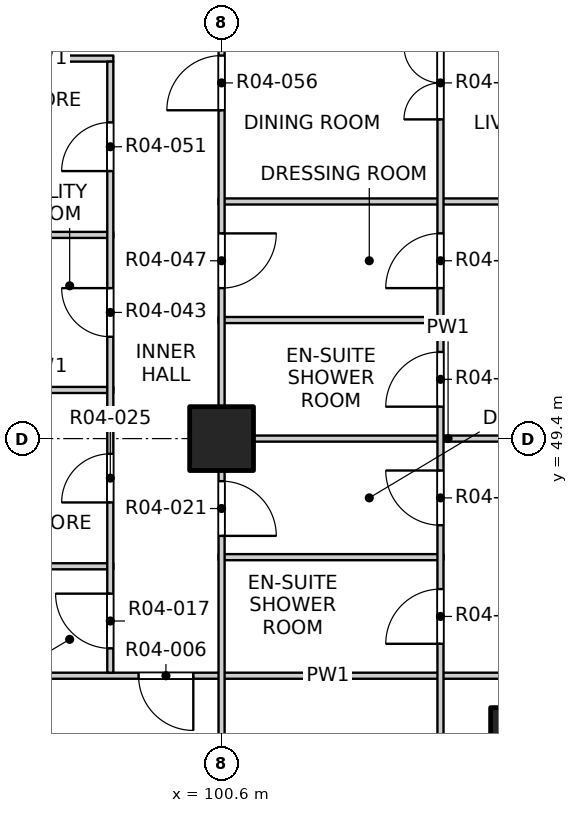
"""IFC4 building model, lengths in metres.
Left out: names, types, materials, properties, quantities, classifications, styles, units other than length and angle.
Written with IfcOpenShell. Run it as: python <this file> out.ifc"""

import sys

from ifc_helpers import new_model, si_unit, direction, frame, frame_2d, origin, origin_2d, place, context, subcontext, project, spatial, rectangle, extrude, element, fill, save


model = new_model("IFC4")
c1 = context("Model", 3, precision=1e-05, world=origin(), true_north=direction((0.0, 1.0)))
c2 = subcontext(c1, "Body", "Model", "MODEL_VIEW")
j1 = project(units=[si_unit("LENGTHUNIT", "METRE"), si_unit("PLANEANGLEUNIT", "RADIAN")], contexts=[c1])
p1 = place(None, origin())
s1 = spatial("IfcSite", under=j1, at=p1, CompositionType="ELEMENT")
p2 = place(p1, origin())
s2 = spatial("IfcBuilding", under=s1, at=p2, CompositionType="ELEMENT")
p3 = place(p2, frame((0.0, 0.0, 58.0)))
s3 = spatial("IfcBuildingStorey", under=s2, at=p3, CompositionType="ELEMENT", Elevation=58.0)
p4 = place(p3, frame((105.5, 44.5, -0.25), z_axis=(0.0, 0.0, 1.0), x_axis=(1.0, 0.0, 0.0)))
e1 = element("IfcColumn", 1, at=p4, inside=s3, PredefinedType="COLUMN", context=c2, shape_type="SweptSolid", body=[
    extrude(rectangle(XDim=0.95, YDim=0.95, at=origin_2d()), origin(), (0.0, 0.0, 1.0), 3.4),
])
p5 = place(p3, frame((100.6, 49.4, -0.25), z_axis=(0.0, 0.0, 1.0), x_axis=(1.0, 0.0, 0.0)))
e2 = element("IfcColumn", 2, at=p5, inside=s3, PredefinedType="COLUMN", context=c2, shape_type="SweptSolid", body=[
    extrude(rectangle(XDim=1.05, YDim=1.05, at=origin_2d()), origin(), (0.0, 0.0, 1.0), 3.4),
])
p6 = place(p3, frame((96.6, 45.5, 0.0), z_axis=(0.0, 0.0, 1.0), x_axis=(1.0, 0.0, 0.0)))
e3 = element("IfcWall", 3, at=p6, inside=s3, PredefinedType="PARTITIONING", context=c2, shape_type="SweptSolid", body=[
    extrude(rectangle(XDim=11.5, YDim=0.1, at=frame_2d((5.75, 0.0))), origin(), (0.0, 0.0, 1.0), 3.15),
])
p7 = place(p6, frame((2.635, 0.0, 0.0)))
e4 = element("IfcOpeningElement", 4, at=p7, cuts=e3, PredefinedType="OPENING", context=c2, shape_type="SweptSolid", body=[
    extrude(rectangle(XDim=0.9, YDim=2.1, at=frame_2d((0.45, 1.05))), frame((0.0, 0.06, 0.0), z_axis=(0.0, -1.0, 0.0), x_axis=(1.0, 0.0, 0.0)), (0.0, 0.0, 1.0), 0.12),
])
p8 = place(p3, frame((96.6, 47.3, 0.0), z_axis=(0.0, 0.0, 1.0), x_axis=(1.0, 0.0, 0.0)))
e5 = element("IfcWall", 5, at=p8, inside=s3, PredefinedType="PARTITIONING", context=c2, shape_type="SweptSolid", body=[
    extrude(rectangle(XDim=2.22, YDim=0.1, at=frame_2d((1.11, 0.0))), origin(), (0.0, 0.0, 1.0), 3.15),
])
p9 = place(p3, frame((100.55, 47.45, 0.0), z_axis=(0.0, 0.0, 1.0), x_axis=(1.0, 0.0, 0.0)))
e6 = element("IfcWall", 6, at=p9, inside=s3, PredefinedType="PARTITIONING", context=c2, shape_type="SweptSolid", body=[
    extrude(rectangle(XDim=3.7, YDim=0.1, at=frame_2d((1.85, 0.0))), origin(), (0.0, 0.0, 1.0), 3.15),
])
p10 = place(p3, frame((100.55, 49.4, 0.0), z_axis=(0.0, 0.0, 1.0), x_axis=(1.0, 0.0, 0.0)))
e7 = element("IfcWall", 7, at=p10, inside=s3, PredefinedType="PARTITIONING", context=c2, shape_type="SweptSolid", body=[
    extrude(rectangle(XDim=7.55, YDim=0.1, at=frame_2d((3.775, 0.0))), origin(), (0.0, 0.0, 1.0), 2.55),
])
p11 = place(p3, frame((96.6, 50.2, 0.0), z_axis=(0.0, 0.0, 1.0), x_axis=(1.0, 0.0, 0.0)))
e8 = element("IfcWall", 8, at=p11, inside=s3, PredefinedType="PARTITIONING", context=c2, shape_type="SweptSolid", body=[
    extrude(rectangle(XDim=2.22, YDim=0.1, at=frame_2d((1.11, 0.0))), origin(), (0.0, 0.0, 1.0), 3.15),
])
p12 = place(p3, frame((100.55, 51.35, 0.0), z_axis=(0.0, 0.0, 1.0), x_axis=(1.0, 0.0, 0.0)))
e9 = element("IfcWall", 9, at=p12, inside=s3, PredefinedType="PARTITIONING", context=c2, shape_type="SweptSolid", body=[
    extrude(rectangle(XDim=3.7, YDim=0.1, at=frame_2d((1.85, 0.0))), origin(), (0.0, 0.0, 1.0), 3.15),
])
p13 = place(p3, frame((96.6, 52.75, 0.0), z_axis=(0.0, 0.0, 1.0), x_axis=(1.0, 0.0, 0.0)))
e10 = element("IfcWall", 10, at=p13, inside=s3, PredefinedType="PARTITIONING", context=c2, shape_type="SweptSolid", body=[
    extrude(rectangle(XDim=2.22, YDim=0.1, at=frame_2d((1.11, 0.0))), origin(), (0.0, 0.0, 1.0), 3.15),
])
p14 = place(p3, frame((100.55, 53.3, 0.0), z_axis=(0.0, 0.0, 1.0), x_axis=(1.0, 0.0, 0.0)))
e11 = element("IfcWall", 11, at=p14, inside=s3, PredefinedType="PARTITIONING", context=c2, shape_type="SweptSolid", body=[
    extrude(rectangle(XDim=7.55, YDim=0.1, at=frame_2d((3.775, 0.0))), origin(), (0.0, 0.0, 1.0), 3.15),
])
p15 = place(p3, frame((96.6, 55.65, 0.0), z_axis=(0.0, 0.0, 1.0), x_axis=(1.0, 0.0, 0.0)))
e12 = element("IfcWall", 12, at=p15, inside=s3, PredefinedType="PARTITIONING", context=c2, shape_type="SweptSolid", body=[
    extrude(rectangle(XDim=2.22, YDim=0.1, at=frame_2d((1.11, 0.0))), origin(), (0.0, 0.0, 1.0), 3.15),
])
p16 = place(p3, frame((98.77, 45.55, 0.0), z_axis=(0.0, 0.0, 1.0), x_axis=(0.0, 1.0, 0.0)))
e13 = element("IfcWall", 13, at=p16, inside=s3, PredefinedType="PARTITIONING", context=c2, shape_type="SweptSolid", body=[
    extrude(rectangle(XDim=10.05, YDim=0.1, at=frame_2d((5.025, 0.0))), origin(), (0.0, 0.0, 1.0), 3.15),
])
p17 = place(p16, frame((0.4, 0.0, 0.0)))
e14 = element("IfcOpeningElement", 14, at=p17, cuts=e13, PredefinedType="OPENING", context=c2, shape_type="SweptSolid", body=[
    extrude(rectangle(XDim=0.9, YDim=2.1, at=frame_2d((0.45, 1.05))), frame((0.0, 0.06, 0.0), z_axis=(0.0, -1.0, 0.0), x_axis=(1.0, 0.0, 0.0)), (0.0, 0.0, 1.0), 0.12),
])
p18 = place(p16, frame((2.8, 0.0, 0.0)))
e15 = element("IfcOpeningElement", 15, at=p18, cuts=e13, PredefinedType="OPENING", context=c2, shape_type="SweptSolid", body=[
    extrude(rectangle(XDim=0.8, YDim=2.1, at=frame_2d((0.4, 1.05))), frame((0.0, 0.06, 0.0), z_axis=(0.0, -1.0, 0.0), x_axis=(1.0, 0.0, 0.0)), (0.0, 0.0, 1.0), 0.12),
])
p19 = place(p16, frame((5.525, 0.0, 0.0)))
e16 = element("IfcOpeningElement", 16, at=p19, cuts=e13, PredefinedType="OPENING", context=c2, shape_type="SweptSolid", body=[
    extrude(rectangle(XDim=0.8, YDim=2.1, at=frame_2d((0.4, 1.05))), frame((0.0, 0.06, 0.0), z_axis=(0.0, -1.0, 0.0), x_axis=(1.0, 0.0, 0.0)), (0.0, 0.0, 1.0), 0.12),
])
p20 = place(p16, frame((8.25, 0.0, 0.0)))
e17 = element("IfcOpeningElement", 17, at=p20, cuts=e13, PredefinedType="OPENING", context=c2, shape_type="SweptSolid", body=[
    extrude(rectangle(XDim=0.8, YDim=2.1, at=frame_2d((0.4, 1.05))), frame((0.0, 0.06, 0.0), z_axis=(0.0, -1.0, 0.0), x_axis=(1.0, 0.0, 0.0)), (0.0, 0.0, 1.0), 0.12),
])
p21 = place(p3, frame((100.6, 41.9, 0.0), z_axis=(0.0, 0.0, 1.0), x_axis=(0.0, 1.0, 0.0)))
e18 = element("IfcWall", 18, at=p21, inside=s3, PredefinedType="PARTITIONING", context=c2, shape_type="SweptSolid", body=[
    extrude(rectangle(XDim=7.5, YDim=0.1, at=frame_2d((3.75, 0.0))), origin(), (0.0, 0.0, 1.0), 2.55),
])
p22 = place(p21, frame((1.2, 0.0, 0.0)))
e19 = element("IfcOpeningElement", 19, at=p22, cuts=e18, PredefinedType="OPENING", context=c2, shape_type="SweptSolid", body=[
    extrude(rectangle(XDim=0.9, YDim=2.1, at=frame_2d((0.45, 1.05))), frame((0.0, 0.06, 0.0), z_axis=(0.0, -1.0, 0.0), x_axis=(1.0, 0.0, 0.0)), (0.0, 0.0, 1.0), 0.12),
])
p23 = place(p21, frame((5.9, 0.0, 0.0)))
e20 = element("IfcOpeningElement", 20, at=p23, cuts=e18, PredefinedType="OPENING", context=c2, shape_type="SweptSolid", body=[
    extrude(rectangle(XDim=0.9, YDim=2.1, at=frame_2d((0.45, 1.05))), frame((0.0, 0.06, 0.0), z_axis=(0.0, -1.0, 0.0), x_axis=(1.0, 0.0, 0.0)), (0.0, 0.0, 1.0), 0.12),
])
p24 = place(p3, frame((100.6, 49.4, 0.0), z_axis=(0.0, 0.0, 1.0), x_axis=(0.0, 1.0, 0.0)))
e21 = element("IfcWall", 21, at=p24, inside=s3, PredefinedType="PARTITIONING", context=c2, shape_type="SweptSolid", body=[
    extrude(rectangle(XDim=31.2, YDim=0.1, at=frame_2d((15.6, 0.0))), origin(), (0.0, 0.0, 1.0), 3.15),
])
p25 = place(p24, frame((2.475, 0.0, 0.0)))
e22 = element("IfcOpeningElement", 22, at=p25, cuts=e21, PredefinedType="OPENING", context=c2, shape_type="SweptSolid", body=[
    extrude(rectangle(XDim=0.9, YDim=2.1, at=frame_2d((0.45, 1.05))), frame((0.0, 0.06, 0.0), z_axis=(0.0, -1.0, 0.0), x_axis=(1.0, 0.0, 0.0)), (0.0, 0.0, 1.0), 0.12),
])
p26 = place(p24, frame((5.4, 0.0, 0.0)))
e23 = element("IfcOpeningElement", 23, at=p26, cuts=e21, PredefinedType="OPENING", context=c2, shape_type="SweptSolid", body=[
    extrude(rectangle(XDim=0.9, YDim=2.1, at=frame_2d((0.45, 1.05))), frame((0.0, 0.06, 0.0), z_axis=(0.0, -1.0, 0.0), x_axis=(1.0, 0.0, 0.0)), (0.0, 0.0, 1.0), 0.12),
])
p27 = place(p24, frame((10.275, 0.0, 0.0)))
e24 = element("IfcOpeningElement", 24, at=p27, cuts=e21, PredefinedType="OPENING", context=c2, shape_type="SweptSolid", body=[
    extrude(rectangle(XDim=0.9, YDim=2.1, at=frame_2d((0.45, 1.05))), frame((0.0, 0.06, 0.0), z_axis=(0.0, -1.0, 0.0), x_axis=(1.0, 0.0, 0.0)), (0.0, 0.0, 1.0), 0.12),
])
p28 = place(p24, frame((13.2, 0.0, 0.0)))
e25 = element("IfcOpeningElement", 25, at=p28, cuts=e21, PredefinedType="OPENING", context=c2, shape_type="SweptSolid", body=[
    extrude(rectangle(XDim=0.9, YDim=2.1, at=frame_2d((0.45, 1.05))), frame((0.0, 0.06, 0.0), z_axis=(0.0, -1.0, 0.0), x_axis=(1.0, 0.0, 0.0)), (0.0, 0.0, 1.0), 0.12),
])
p29 = place(p24, frame((17.1, 0.0, 0.0)))
e26 = element("IfcOpeningElement", 26, at=p29, cuts=e21, PredefinedType="OPENING", context=c2, shape_type="SweptSolid", body=[
    extrude(rectangle(XDim=0.9, YDim=2.1, at=frame_2d((0.45, 1.05))), frame((0.0, 0.06, 0.0), z_axis=(0.0, -1.0, 0.0), x_axis=(1.0, 0.0, 0.0)), (0.0, 0.0, 1.0), 0.12),
])
p30 = place(p24, frame((21.8, 0.0, 0.0)))
e27 = element("IfcOpeningElement", 27, at=p30, cuts=e21, PredefinedType="OPENING", context=c2, shape_type="SweptSolid", body=[
    extrude(rectangle(XDim=0.9, YDim=2.1, at=frame_2d((0.45, 1.05))), frame((0.0, 0.06, 0.0), z_axis=(0.0, -1.0, 0.0), x_axis=(1.0, 0.0, 0.0)), (0.0, 0.0, 1.0), 0.12),
])
p31 = place(p24, frame((25.875, 0.0, 0.0)))
e28 = element("IfcOpeningElement", 28, at=p31, cuts=e21, PredefinedType="OPENING", context=c2, shape_type="SweptSolid", body=[
    extrude(rectangle(XDim=0.9, YDim=2.1, at=frame_2d((0.45, 1.05))), frame((0.0, 0.06, 0.0), z_axis=(0.0, -1.0, 0.0), x_axis=(1.0, 0.0, 0.0)), (0.0, 0.0, 1.0), 0.12),
])
p32 = place(p24, frame((28.8, 0.0, 0.0)))
e29 = element("IfcOpeningElement", 29, at=p32, cuts=e21, PredefinedType="OPENING", context=c2, shape_type="SweptSolid", body=[
    extrude(rectangle(XDim=0.9, YDim=2.1, at=frame_2d((0.45, 1.05))), frame((0.0, 0.06, 0.0), z_axis=(0.0, -1.0, 0.0), x_axis=(1.0, 0.0, 0.0)), (0.0, 0.0, 1.0), 0.12),
])
p33 = place(p3, frame((104.2, 41.9, 0.0), z_axis=(0.0, 0.0, 1.0), x_axis=(0.0, 1.0, 0.0)))
e30 = element("IfcWall", 30, at=p33, inside=s3, PredefinedType="PARTITIONING", context=c2, shape_type="SweptSolid", body=[
    extrude(rectangle(XDim=46.2, YDim=0.1, at=frame_2d((23.1, 0.0))), origin(), (0.0, 0.0, 1.0), 3.15),
])
p34 = place(p33, frame((1.05, 0.0, 0.0)))
e31 = element("IfcOpeningElement", 31, at=p34, cuts=e30, PredefinedType="OPENING", context=c2, shape_type="SweptSolid", body=[
    extrude(rectangle(XDim=1.2, YDim=2.1, at=frame_2d((0.6, 1.05))), frame((0.0, 0.06, 0.0), z_axis=(0.0, -1.0, 0.0), x_axis=(1.0, 0.0, 0.0)), (0.0, 0.0, 1.0), 0.12),
])
p35 = place(p33, frame((4.125, 0.0, 0.0)))
e32 = element("IfcOpeningElement", 32, at=p35, cuts=e30, PredefinedType="OPENING", context=c2, shape_type="SweptSolid", body=[
    extrude(rectangle(XDim=0.9, YDim=2.1, at=frame_2d((0.45, 1.05))), frame((0.0, 0.06, 0.0), z_axis=(0.0, -1.0, 0.0), x_axis=(1.0, 0.0, 0.0)), (0.0, 0.0, 1.0), 0.12),
])
p36 = place(p33, frame((6.075, 0.0, 0.0)))
e33 = element("IfcOpeningElement", 33, at=p36, cuts=e30, PredefinedType="OPENING", context=c2, shape_type="SweptSolid", body=[
    extrude(rectangle(XDim=0.9, YDim=2.1, at=frame_2d((0.45, 1.05))), frame((0.0, 0.06, 0.0), z_axis=(0.0, -1.0, 0.0), x_axis=(1.0, 0.0, 0.0)), (0.0, 0.0, 1.0), 0.12),
])
p37 = place(p33, frame((8.025, 0.0, 0.0)))
e34 = element("IfcOpeningElement", 34, at=p37, cuts=e30, PredefinedType="OPENING", context=c2, shape_type="SweptSolid", body=[
    extrude(rectangle(XDim=0.9, YDim=2.1, at=frame_2d((0.45, 1.05))), frame((0.0, 0.06, 0.0), z_axis=(0.0, -1.0, 0.0), x_axis=(1.0, 0.0, 0.0)), (0.0, 0.0, 1.0), 0.12),
])
p38 = place(p33, frame((9.975, 0.0, 0.0)))
e35 = element("IfcOpeningElement", 35, at=p38, cuts=e30, PredefinedType="OPENING", context=c2, shape_type="SweptSolid", body=[
    extrude(rectangle(XDim=0.9, YDim=2.1, at=frame_2d((0.45, 1.05))), frame((0.0, 0.06, 0.0), z_axis=(0.0, -1.0, 0.0), x_axis=(1.0, 0.0, 0.0)), (0.0, 0.0, 1.0), 0.12),
])
p39 = place(p33, frame((12.75, 0.0, 0.0)))
e36 = element("IfcOpeningElement", 36, at=p39, cuts=e30, PredefinedType="OPENING", context=c2, shape_type="SweptSolid", body=[
    extrude(rectangle(XDim=1.2, YDim=2.1, at=frame_2d((0.6, 1.05))), frame((0.0, 0.06, 0.0), z_axis=(0.0, -1.0, 0.0), x_axis=(1.0, 0.0, 0.0)), (0.0, 0.0, 1.0), 0.12),
])
p40 = place(p33, frame((15.825, 0.0, 0.0)))
e37 = element("IfcOpeningElement", 37, at=p40, cuts=e30, PredefinedType="OPENING", context=c2, shape_type="SweptSolid", body=[
    extrude(rectangle(XDim=0.9, YDim=2.1, at=frame_2d((0.45, 1.05))), frame((0.0, 0.06, 0.0), z_axis=(0.0, -1.0, 0.0), x_axis=(1.0, 0.0, 0.0)), (0.0, 0.0, 1.0), 0.12),
])
p41 = place(p33, frame((17.775, 0.0, 0.0)))
e38 = element("IfcOpeningElement", 38, at=p41, cuts=e30, PredefinedType="OPENING", context=c2, shape_type="SweptSolid", body=[
    extrude(rectangle(XDim=0.9, YDim=2.1, at=frame_2d((0.45, 1.05))), frame((0.0, 0.06, 0.0), z_axis=(0.0, -1.0, 0.0), x_axis=(1.0, 0.0, 0.0)), (0.0, 0.0, 1.0), 0.12),
])
p42 = place(p33, frame((20.55, 0.0, 0.0)))
e39 = element("IfcOpeningElement", 39, at=p42, cuts=e30, PredefinedType="OPENING", context=c2, shape_type="SweptSolid", body=[
    extrude(rectangle(XDim=1.2, YDim=2.1, at=frame_2d((0.6, 1.05))), frame((0.0, 0.06, 0.0), z_axis=(0.0, -1.0, 0.0), x_axis=(1.0, 0.0, 0.0)), (0.0, 0.0, 1.0), 0.12),
])
p43 = place(p33, frame((24.45, 0.0, 0.0)))
e40 = element("IfcOpeningElement", 40, at=p43, cuts=e30, PredefinedType="OPENING", context=c2, shape_type="SweptSolid", body=[
    extrude(rectangle(XDim=1.2, YDim=2.1, at=frame_2d((0.6, 1.05))), frame((0.0, 0.06, 0.0), z_axis=(0.0, -1.0, 0.0), x_axis=(1.0, 0.0, 0.0)), (0.0, 0.0, 1.0), 0.12),
])
p44 = place(p33, frame((27.525, 0.0, 0.0)))
e41 = element("IfcOpeningElement", 41, at=p44, cuts=e30, PredefinedType="OPENING", context=c2, shape_type="SweptSolid", body=[
    extrude(rectangle(XDim=0.9, YDim=2.1, at=frame_2d((0.45, 1.05))), frame((0.0, 0.06, 0.0), z_axis=(0.0, -1.0, 0.0), x_axis=(1.0, 0.0, 0.0)), (0.0, 0.0, 1.0), 0.12),
])
p45 = place(p33, frame((29.475, 0.0, 0.0)))
e42 = element("IfcOpeningElement", 42, at=p45, cuts=e30, PredefinedType="OPENING", context=c2, shape_type="SweptSolid", body=[
    extrude(rectangle(XDim=0.9, YDim=2.1, at=frame_2d((0.45, 1.05))), frame((0.0, 0.06, 0.0), z_axis=(0.0, -1.0, 0.0), x_axis=(1.0, 0.0, 0.0)), (0.0, 0.0, 1.0), 0.12),
])
p46 = place(p33, frame((31.425, 0.0, 0.0)))
e43 = element("IfcOpeningElement", 43, at=p46, cuts=e30, PredefinedType="OPENING", context=c2, shape_type="SweptSolid", body=[
    extrude(rectangle(XDim=0.9, YDim=2.1, at=frame_2d((0.45, 1.05))), frame((0.0, 0.06, 0.0), z_axis=(0.0, -1.0, 0.0), x_axis=(1.0, 0.0, 0.0)), (0.0, 0.0, 1.0), 0.12),
])
p47 = place(p33, frame((33.375, 0.0, 0.0)))
e44 = element("IfcOpeningElement", 44, at=p47, cuts=e30, PredefinedType="OPENING", context=c2, shape_type="SweptSolid", body=[
    extrude(rectangle(XDim=0.9, YDim=2.1, at=frame_2d((0.45, 1.05))), frame((0.0, 0.06, 0.0), z_axis=(0.0, -1.0, 0.0), x_axis=(1.0, 0.0, 0.0)), (0.0, 0.0, 1.0), 0.12),
])
p48 = place(p33, frame((36.15, 0.0, 0.0)))
e45 = element("IfcOpeningElement", 45, at=p48, cuts=e30, PredefinedType="OPENING", context=c2, shape_type="SweptSolid", body=[
    extrude(rectangle(XDim=1.2, YDim=2.1, at=frame_2d((0.6, 1.05))), frame((0.0, 0.06, 0.0), z_axis=(0.0, -1.0, 0.0), x_axis=(1.0, 0.0, 0.0)), (0.0, 0.0, 1.0), 0.12),
])
p49 = place(p33, frame((39.225, 0.0, 0.0)))
e46 = element("IfcOpeningElement", 46, at=p49, cuts=e30, PredefinedType="OPENING", context=c2, shape_type="SweptSolid", body=[
    extrude(rectangle(XDim=0.9, YDim=2.1, at=frame_2d((0.45, 1.05))), frame((0.0, 0.06, 0.0), z_axis=(0.0, -1.0, 0.0), x_axis=(1.0, 0.0, 0.0)), (0.0, 0.0, 1.0), 0.12),
])
p50 = place(p33, frame((41.175, 0.0, 0.0)))
e47 = element("IfcOpeningElement", 47, at=p50, cuts=e30, PredefinedType="OPENING", context=c2, shape_type="SweptSolid", body=[
    extrude(rectangle(XDim=0.9, YDim=2.1, at=frame_2d((0.45, 1.05))), frame((0.0, 0.06, 0.0), z_axis=(0.0, -1.0, 0.0), x_axis=(1.0, 0.0, 0.0)), (0.0, 0.0, 1.0), 0.12),
])
p51 = place(p33, frame((43.95, 0.0, 0.0)))
e48 = element("IfcOpeningElement", 48, at=p51, cuts=e30, PredefinedType="OPENING", context=c2, shape_type="SweptSolid", body=[
    extrude(rectangle(XDim=1.2, YDim=2.1, at=frame_2d((0.6, 1.05))), frame((0.0, 0.06, 0.0), z_axis=(0.0, -1.0, 0.0), x_axis=(1.0, 0.0, 0.0)), (0.0, 0.0, 1.0), 0.12),
])
p52 = place(p7, origin())
e49 = element("IfcDoor", 49, at=p52, inside=s3, OperationType="SINGLE_SWING_LEFT", PredefinedType="DOOR", context=c2, shape_type="SweptSolid", body=[
    extrude(rectangle(XDim=0.9, YDim=2.1, at=frame_2d((0.45, 1.05))), frame((0.0, 0.025, 0.0), z_axis=(0.0, -1.0, 0.0), x_axis=(1.0, 0.0, 0.0)), (0.0, 0.0, 1.0), 0.05),
])
fill(e4, e49)
p53 = place(p17, origin())
e50 = element("IfcDoor", 50, at=p53, inside=s3, OperationType="SINGLE_SWING_RIGHT", PredefinedType="DOOR", context=c2, shape_type="SweptSolid", body=[
    extrude(rectangle(XDim=0.9, YDim=2.1, at=frame_2d((0.45, 1.05))), frame((0.0, 0.025, 0.0), z_axis=(0.0, -1.0, 0.0), x_axis=(1.0, 0.0, 0.0)), (0.0, 0.0, 1.0), 0.05),
])
fill(e14, e50)
p54 = place(p35, origin())
e51 = element("IfcDoor", 51, at=p54, inside=s3, OperationType="SINGLE_SWING_LEFT", PredefinedType="DOOR", context=c2, shape_type="SweptSolid", body=[
    extrude(rectangle(XDim=0.9, YDim=2.1, at=frame_2d((0.45, 1.05))), frame((0.0, 0.025, 0.0), z_axis=(0.0, -1.0, 0.0), x_axis=(1.0, 0.0, 0.0)), (0.0, 0.0, 1.0), 0.05),
])
fill(e32, e51)
p55 = place(p23, origin())
e52 = element("IfcDoor", 52, at=p55, inside=s3, OperationType="SINGLE_SWING_RIGHT", PredefinedType="DOOR", context=c2, shape_type="SweptSolid", body=[
    extrude(rectangle(XDim=0.9, YDim=2.1, at=frame_2d((0.45, 1.05))), frame((0.0, 0.025, 0.0), z_axis=(0.0, -1.0, 0.0), x_axis=(1.0, 0.0, 0.0)), (0.0, 0.0, 1.0), 0.05),
])
fill(e20, e52)
p56 = place(p36, origin())
e53 = element("IfcDoor", 53, at=p56, inside=s3, OperationType="SINGLE_SWING_RIGHT", PredefinedType="DOOR", context=c2, shape_type="SweptSolid", body=[
    extrude(rectangle(XDim=0.9, YDim=2.1, at=frame_2d((0.45, 1.05))), frame((0.0, 0.025, 0.0), z_axis=(0.0, -1.0, 0.0), x_axis=(1.0, 0.0, 0.0)), (0.0, 0.0, 1.0), 0.05),
])
fill(e33, e53)
p57 = place(p18, origin())
e54 = element("IfcDoor", 54, at=p57, inside=s3, OperationType="SINGLE_SWING_LEFT", PredefinedType="DOOR", context=c2, shape_type="SweptSolid", body=[
    extrude(rectangle(XDim=0.8, YDim=2.1, at=frame_2d((0.4, 1.05))), frame((0.0, 0.025, 0.0), z_axis=(0.0, -1.0, 0.0), x_axis=(1.0, 0.0, 0.0)), (0.0, 0.0, 1.0), 0.05),
])
fill(e15, e54)
p58 = place(p37, origin())
e55 = element("IfcDoor", 55, at=p58, inside=s3, OperationType="SINGLE_SWING_LEFT", PredefinedType="DOOR", context=c2, shape_type="SweptSolid", body=[
    extrude(rectangle(XDim=0.9, YDim=2.1, at=frame_2d((0.45, 1.05))), frame((0.0, 0.025, 0.0), z_axis=(0.0, -1.0, 0.0), x_axis=(1.0, 0.0, 0.0)), (0.0, 0.0, 1.0), 0.05),
])
fill(e34, e55)
p59 = place(p19, origin())
e56 = element("IfcDoor", 56, at=p59, inside=s3, OperationType="SINGLE_SWING_RIGHT", PredefinedType="DOOR", context=c2, shape_type="SweptSolid", body=[
    extrude(rectangle(XDim=0.8, YDim=2.1, at=frame_2d((0.4, 1.05))), frame((0.0, 0.025, 0.0), z_axis=(0.0, -1.0, 0.0), x_axis=(1.0, 0.0, 0.0)), (0.0, 0.0, 1.0), 0.05),
])
fill(e16, e56)
p60 = place(p25, origin())
e57 = element("IfcDoor", 57, at=p60, inside=s3, OperationType="SINGLE_SWING_LEFT", PredefinedType="DOOR", context=c2, shape_type="SweptSolid", body=[
    extrude(rectangle(XDim=0.9, YDim=2.1, at=frame_2d((0.45, 1.05))), frame((0.0, 0.025, 0.0), z_axis=(0.0, -1.0, 0.0), x_axis=(1.0, 0.0, 0.0)), (0.0, 0.0, 1.0), 0.05),
])
fill(e22, e57)
p61 = place(p38, origin())
e58 = element("IfcDoor", 58, at=p61, inside=s3, OperationType="SINGLE_SWING_LEFT", PredefinedType="DOOR", context=c2, shape_type="SweptSolid", body=[
    extrude(rectangle(XDim=0.9, YDim=2.1, at=frame_2d((0.45, 1.05))), frame((0.0, 0.025, 0.0), z_axis=(0.0, -1.0, 0.0), x_axis=(1.0, 0.0, 0.0)), (0.0, 0.0, 1.0), 0.05),
])
fill(e35, e58)
p62 = place(p20, origin())
e59 = element("IfcDoor", 59, at=p62, inside=s3, OperationType="SINGLE_SWING_LEFT", PredefinedType="DOOR", context=c2, shape_type="SweptSolid", body=[
    extrude(rectangle(XDim=0.8, YDim=2.1, at=frame_2d((0.4, 1.05))), frame((0.0, 0.025, 0.0), z_axis=(0.0, -1.0, 0.0), x_axis=(1.0, 0.0, 0.0)), (0.0, 0.0, 1.0), 0.05),
])
fill(e17, e59)
p63 = place(p26, origin())
e60 = element("IfcDoor", 60, at=p63, inside=s3, OperationType="SINGLE_SWING_LEFT", PredefinedType="DOOR", context=c2, shape_type="SweptSolid", body=[
    extrude(rectangle(XDim=0.9, YDim=2.1, at=frame_2d((0.45, 1.05))), frame((0.0, 0.025, 0.0), z_axis=(0.0, -1.0, 0.0), x_axis=(1.0, 0.0, 0.0)), (0.0, 0.0, 1.0), 0.05),
])
fill(e23, e60)
p64 = place(p39, origin())
e61 = element("IfcDoor", 61, at=p64, inside=s3, OperationType="DOUBLE_DOOR_SINGLE_SWING", PredefinedType="DOOR", context=c2, shape_type="SweptSolid", body=[
    extrude(rectangle(XDim=1.2, YDim=2.1, at=frame_2d((0.6, 1.05))), frame((0.0, 0.025, 0.0), z_axis=(0.0, -1.0, 0.0), x_axis=(1.0, 0.0, 0.0)), (0.0, 0.0, 1.0), 0.05),
])
fill(e36, e61)
save(model, sys.argv[1])
